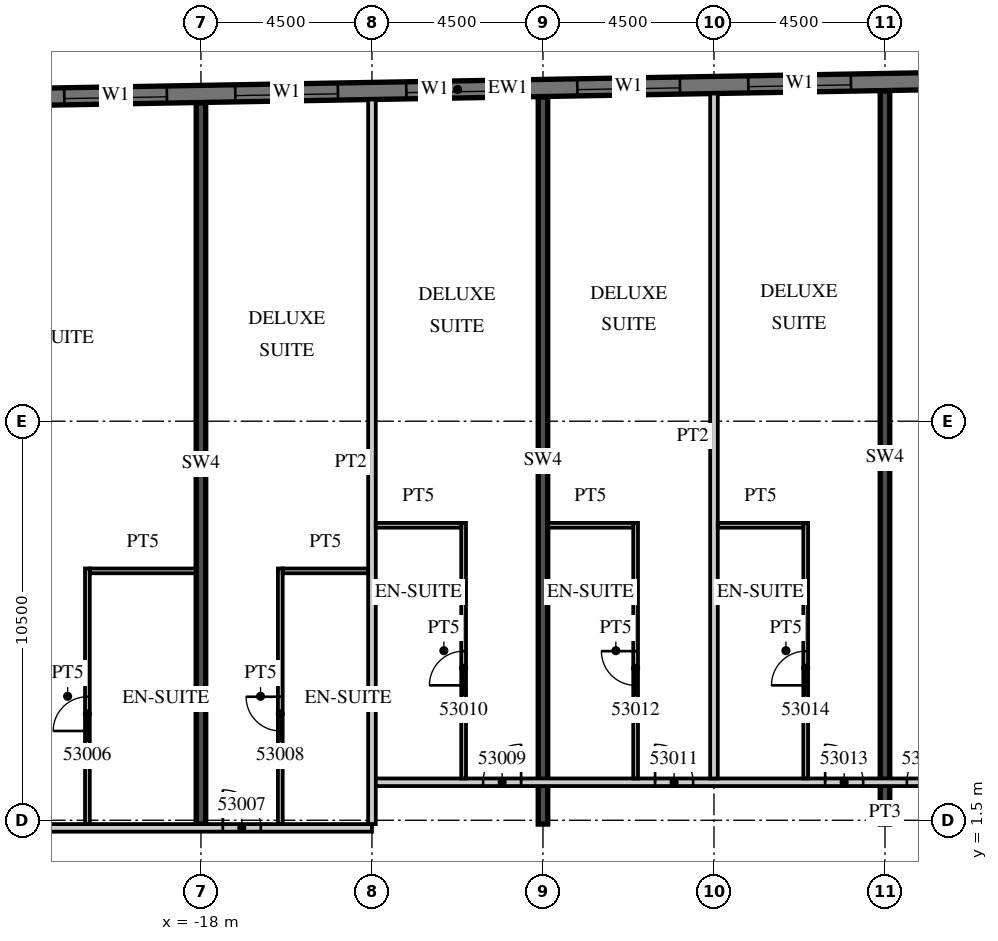
"""IFC4 building model, lengths in metres.
Left out: names, types, materials, properties, quantities, classifications, styles, units other than length and angle.
Written with IfcOpenShell. Run it as: python <this file> out.ifc"""

import sys

from ifc_helpers import new_model, si_unit, direction, frame, frame_2d, origin, place, context, subcontext, project, spatial, rectangle, extrude, element, fill, save


model = new_model("IFC4")
c1 = context("Model", 3, precision=1e-05, world=origin(), true_north=direction((0.0, 1.0)))
c2 = subcontext(c1, "Body", "Model", "MODEL_VIEW")
j1 = project(units=[si_unit("LENGTHUNIT", "METRE"), si_unit("PLANEANGLEUNIT", "RADIAN")], contexts=[c1])
p1 = place(None, origin())
s1 = spatial("IfcSite", under=j1, at=p1, CompositionType="ELEMENT")
p2 = place(p1, origin())
s2 = spatial("IfcBuilding", under=s1, at=p2, CompositionType="ELEMENT")
p3 = place(p2, frame((0.0, 0.0, 221.0)))
s3 = spatial("IfcBuildingStorey", under=s2, at=p3, CompositionType="ELEMENT", Elevation=221.0)
p4 = place(p3, frame((-18.0, 1.4, 0.0), z_axis=(0.0, 0.0, 1.0), x_axis=(0.0, 1.0, 0.0)))
e1 = element("IfcWall", 1, at=p4, inside=s3, PredefinedType="SHEAR", context=c2, shape_type="SweptSolid", body=[
    extrude(rectangle(XDim=18.974, YDim=0.25, at=frame_2d((9.487, 0.0))), origin(), (0.0, 0.0, 1.0), 3.3),
])
p5 = place(p3, frame((-9.0, 1.4, 0.0), z_axis=(0.0, 0.0, 1.0), x_axis=(0.0, 1.0, 0.0)))
e2 = element("IfcWall", 2, at=p5, inside=s3, PredefinedType="SHEAR", context=c2, shape_type="SweptSolid", body=[
    extrude(rectangle(XDim=19.132, YDim=0.25, at=frame_2d((9.566, 0.0))), origin(), (0.0, 0.0, 1.0), 3.3),
])
p6 = place(p3, frame((0.0, 1.4, 0.0), z_axis=(0.0, 0.0, 1.0), x_axis=(0.0, 1.0, 0.0)))
e3 = element("IfcWall", 3, at=p6, inside=s3, PredefinedType="SHEAR", context=c2, shape_type="SweptSolid", body=[
    extrude(rectangle(XDim=19.289, YDim=0.25, at=frame_2d((9.644, 0.0))), origin(), (0.0, 0.0, 1.0), 3.3),
])
p7 = place(p3, frame((13.504, 21.161, 0.0), z_axis=(0.0, 0.0, 1.0), x_axis=(-0.999847763257, -0.017448504532, 0.0)))
e4 = element("IfcWall", 4, at=p7, inside=s3, PredefinedType="SOLIDWALL", context=c2, shape_type="SweptSolid", body=[
    extrude(rectangle(XDim=46.859, YDim=0.45, at=frame_2d((23.43, 0.0))), origin(), (0.0, 0.0, 1.0), 3.02),
])
p8 = place(p7, frame((0.9, 0.0, 0.45)))
e5 = element("IfcOpeningElement", 5, at=p8, cuts=e4, PredefinedType="OPENING", context=c2, shape_type="SweptSolid", body=[
    extrude(rectangle(XDim=2.7, YDim=2.25, at=frame_2d((1.35, 1.125))), frame((0.0, 0.235, 0.0), z_axis=(0.0, -1.0, 0.0), x_axis=(1.0, 0.0, 0.0)), (0.0, 0.0, 1.0), 0.47),
])
p9 = place(p7, frame((5.401, 0.0, 0.45)))
e6 = element("IfcOpeningElement", 6, at=p9, cuts=e4, PredefinedType="OPENING", context=c2, shape_type="SweptSolid", body=[
    extrude(rectangle(XDim=2.7, YDim=2.25, at=frame_2d((1.35, 1.125))), frame((0.0, 0.235, 0.0), z_axis=(0.0, -1.0, 0.0), x_axis=(1.0, 0.0, 0.0)), (0.0, 0.0, 1.0), 0.47),
])
p10 = place(p7, frame((9.902, 0.0, 0.45)))
e7 = element("IfcOpeningElement", 7, at=p10, cuts=e4, PredefinedType="OPENING", context=c2, shape_type="SweptSolid", body=[
    extrude(rectangle(XDim=2.7, YDim=2.25, at=frame_2d((1.35, 1.125))), frame((0.0, 0.235, 0.0), z_axis=(0.0, -1.0, 0.0), x_axis=(1.0, 0.0, 0.0)), (0.0, 0.0, 1.0), 0.47),
])
p11 = place(p7, frame((14.402, 0.0, 0.45)))
e8 = element("IfcOpeningElement", 8, at=p11, cuts=e4, PredefinedType="OPENING", context=c2, shape_type="SweptSolid", body=[
    extrude(rectangle(XDim=2.7, YDim=2.25, at=frame_2d((1.35, 1.125))), frame((0.0, 0.235, 0.0), z_axis=(0.0, -1.0, 0.0), x_axis=(1.0, 0.0, 0.0)), (0.0, 0.0, 1.0), 0.47),
])
p12 = place(p7, frame((18.903, 0.0, 0.45)))
e9 = element("IfcOpeningElement", 9, at=p12, cuts=e4, PredefinedType="OPENING", context=c2, shape_type="SweptSolid", body=[
    extrude(rectangle(XDim=2.7, YDim=2.25, at=frame_2d((1.35, 1.125))), frame((0.0, 0.235, 0.0), z_axis=(0.0, -1.0, 0.0), x_axis=(1.0, 0.0, 0.0)), (0.0, 0.0, 1.0), 0.47),
])
p13 = place(p7, frame((23.404, 0.0, 0.45)))
e10 = element("IfcOpeningElement", 10, at=p13, cuts=e4, PredefinedType="OPENING", context=c2, shape_type="SweptSolid", body=[
    extrude(rectangle(XDim=2.7, YDim=2.25, at=frame_2d((1.35, 1.125))), frame((0.0, 0.235, 0.0), z_axis=(0.0, -1.0, 0.0), x_axis=(1.0, 0.0, 0.0)), (0.0, 0.0, 1.0), 0.47),
])
p14 = place(p7, frame((27.904, 0.0, 0.45)))
e11 = element("IfcOpeningElement", 11, at=p14, cuts=e4, PredefinedType="OPENING", context=c2, shape_type="SweptSolid", body=[
    extrude(rectangle(XDim=2.7, YDim=2.25, at=frame_2d((1.35, 1.125))), frame((0.0, 0.235, 0.0), z_axis=(0.0, -1.0, 0.0), x_axis=(1.0, 0.0, 0.0)), (0.0, 0.0, 1.0), 0.47),
])
p15 = place(p7, frame((32.405, 0.0, 0.45)))
e12 = element("IfcOpeningElement", 12, at=p15, cuts=e4, PredefinedType="OPENING", context=c2, shape_type="SweptSolid", body=[
    extrude(rectangle(XDim=2.7, YDim=2.25, at=frame_2d((1.35, 1.125))), frame((0.0, 0.235, 0.0), z_axis=(0.0, -1.0, 0.0), x_axis=(1.0, 0.0, 0.0)), (0.0, 0.0, 1.0), 0.47),
])
p16 = place(p7, frame((36.906, 0.0, 0.45)))
e13 = element("IfcOpeningElement", 13, at=p16, cuts=e4, PredefinedType="OPENING", context=c2, shape_type="SweptSolid", body=[
    extrude(rectangle(XDim=2.7, YDim=2.25, at=frame_2d((1.35, 1.125))), frame((0.0, 0.235, 0.0), z_axis=(0.0, -1.0, 0.0), x_axis=(1.0, 0.0, 0.0)), (0.0, 0.0, 1.0), 0.47),
])
p17 = place(p7, frame((41.406, 0.0, 0.45)))
e14 = element("IfcOpeningElement", 14, at=p17, cuts=e4, PredefinedType="OPENING", context=c2, shape_type="SweptSolid", body=[
    extrude(rectangle(XDim=2.7, YDim=2.25, at=frame_2d((1.35, 1.125))), frame((0.0, 0.235, 0.0), z_axis=(0.0, -1.0, 0.0), x_axis=(1.0, 0.0, 0.0)), (0.0, 0.0, 1.0), 0.47),
])
p18 = place(p3, frame((-36.566, 1.3, 0.0), z_axis=(0.0, 0.0, 1.0), x_axis=(1.0, 0.0, 0.0)))
e15 = element("IfcWall", 15, at=p18, inside=s3, PredefinedType="PARTITIONING", context=c2, shape_type="SweptSolid", body=[
    extrude(rectangle(XDim=23.066, YDim=0.2, at=frame_2d((11.533, 0.0))), origin(), (0.0, 0.0, 1.0), 3.02),
])
p19 = place(p18, frame((1.141, 0.0, 0.0)))
e16 = element("IfcOpeningElement", 16, at=p19, cuts=e15, PredefinedType="OPENING", context=c2, shape_type="SweptSolid", body=[
    extrude(rectangle(XDim=1.0, YDim=2.1, at=frame_2d((0.5, 1.05))), frame((0.0, 0.11, 0.0), z_axis=(0.0, -1.0, 0.0), x_axis=(1.0, 0.0, 0.0)), (0.0, 0.0, 1.0), 0.22),
])
p20 = place(p18, frame((7.991, 0.0, 0.0)))
e17 = element("IfcOpeningElement", 17, at=p20, cuts=e15, PredefinedType="OPENING", context=c2, shape_type="SweptSolid", body=[
    extrude(rectangle(XDim=1.0, YDim=2.1, at=frame_2d((0.5, 1.05))), frame((0.0, 0.11, 0.0), z_axis=(0.0, -1.0, 0.0), x_axis=(1.0, 0.0, 0.0)), (0.0, 0.0, 1.0), 0.22),
])
p21 = place(p18, frame((12.004, 0.0, 0.0)))
e18 = element("IfcOpeningElement", 18, at=p21, cuts=e15, PredefinedType="OPENING", context=c2, shape_type="SweptSolid", body=[
    extrude(rectangle(XDim=1.2, YDim=2.1, at=frame_2d((0.6, 1.05))), frame((0.0, 0.11, 0.0), z_axis=(0.0, -1.0, 0.0), x_axis=(1.0, 0.0, 0.0)), (0.0, 0.0, 1.0), 0.22),
])
p22 = place(p18, frame((19.141, 0.0, 0.0)))
e19 = element("IfcOpeningElement", 19, at=p22, cuts=e15, PredefinedType="OPENING", context=c2, shape_type="SweptSolid", body=[
    extrude(rectangle(XDim=1.0, YDim=2.1, at=frame_2d((0.5, 1.05))), frame((0.0, 0.11, 0.0), z_axis=(0.0, -1.0, 0.0), x_axis=(1.0, 0.0, 0.0)), (0.0, 0.0, 1.0), 0.22),
])
p23 = place(p3, frame((-13.5, 2.5, 0.0), z_axis=(0.0, 0.0, 1.0), x_axis=(1.0, 0.0, 0.0)))
e20 = element("IfcWall", 20, at=p23, inside=s3, PredefinedType="PARTITIONING", context=c2, shape_type="SweptSolid", body=[
    extrude(rectangle(XDim=27.0, YDim=0.2, at=frame_2d((13.5, 0.0))), origin(), (0.0, 0.0, 1.0), 3.02),
])
p24 = place(p23, frame((2.925, 0.0, 0.0)))
e21 = element("IfcOpeningElement", 21, at=p24, cuts=e20, PredefinedType="OPENING", context=c2, shape_type="SweptSolid", body=[
    extrude(rectangle(XDim=1.0, YDim=2.1, at=frame_2d((0.5, 1.05))), frame((0.0, 0.11, 0.0), z_axis=(0.0, -1.0, 0.0), x_axis=(1.0, 0.0, 0.0)), (0.0, 0.0, 1.0), 0.22),
])
p25 = place(p23, frame((7.45, 0.0, 0.0)))
e22 = element("IfcOpeningElement", 22, at=p25, cuts=e20, PredefinedType="OPENING", context=c2, shape_type="SweptSolid", body=[
    extrude(rectangle(XDim=1.0, YDim=2.1, at=frame_2d((0.5, 1.05))), frame((0.0, 0.11, 0.0), z_axis=(0.0, -1.0, 0.0), x_axis=(1.0, 0.0, 0.0)), (0.0, 0.0, 1.0), 0.22),
])
p26 = place(p23, frame((11.925, 0.0, 0.0)))
e23 = element("IfcOpeningElement", 23, at=p26, cuts=e20, PredefinedType="OPENING", context=c2, shape_type="SweptSolid", body=[
    extrude(rectangle(XDim=1.0, YDim=2.1, at=frame_2d((0.5, 1.05))), frame((0.0, 0.11, 0.0), z_axis=(0.0, -1.0, 0.0), x_axis=(1.0, 0.0, 0.0)), (0.0, 0.0, 1.0), 0.22),
])
p27 = place(p23, frame((14.075, 0.0, 0.0)))
e24 = element("IfcOpeningElement", 24, at=p27, cuts=e20, PredefinedType="OPENING", context=c2, shape_type="SweptSolid", body=[
    extrude(rectangle(XDim=1.0, YDim=2.1, at=frame_2d((0.5, 1.05))), frame((0.0, 0.11, 0.0), z_axis=(0.0, -1.0, 0.0), x_axis=(1.0, 0.0, 0.0)), (0.0, 0.0, 1.0), 0.22),
])
p28 = place(p23, frame((20.925, 0.0, 0.0)))
e25 = element("IfcOpeningElement", 25, at=p28, cuts=e20, PredefinedType="OPENING", context=c2, shape_type="SweptSolid", body=[
    extrude(rectangle(XDim=1.0, YDim=2.1, at=frame_2d((0.5, 1.05))), frame((0.0, 0.11, 0.0), z_axis=(0.0, -1.0, 0.0), x_axis=(1.0, 0.0, 0.0)), (0.0, 0.0, 1.0), 0.22),
])
p29 = place(p23, frame((25.425, 0.0, 0.0)))
e26 = element("IfcOpeningElement", 26, at=p29, cuts=e20, PredefinedType="OPENING", context=c2, shape_type="SweptSolid", body=[
    extrude(rectangle(XDim=1.0, YDim=2.1, at=frame_2d((0.5, 1.05))), frame((0.0, 0.11, 0.0), z_axis=(0.0, -1.0, 0.0), x_axis=(1.0, 0.0, 0.0)), (0.0, 0.0, 1.0), 0.22),
])
p30 = place(p3, frame((-20.988, 1.4, 0.0), z_axis=(0.0, 0.0, 1.0), x_axis=(0.0, 1.0, 0.0)))
e27 = element("IfcWall", 27, at=p30, inside=s3, PredefinedType="PARTITIONING", context=c2, shape_type="SweptSolid", body=[
    extrude(rectangle(XDim=6.725, YDim=0.125, at=frame_2d((3.363, 0.0))), origin(), (0.0, 0.0, 1.0), 3.02),
])
p31 = place(p30, frame((2.45, 0.0, 0.0)))
e28 = element("IfcOpeningElement", 28, at=p31, cuts=e27, PredefinedType="OPENING", context=c2, shape_type="SweptSolid", body=[
    extrude(rectangle(XDim=0.9, YDim=2.1, at=frame_2d((0.45, 1.05))), frame((0.0, 0.073, 0.0), z_axis=(0.0, -1.0, 0.0), x_axis=(1.0, 0.0, 0.0)), (0.0, 0.0, 1.0), 0.145),
])
p32 = place(p3, frame((-20.925, 8.062, 0.0), z_axis=(0.0, 0.0, 1.0), x_axis=(1.0, 0.0, 0.0)))
e29 = element("IfcWall", 29, at=p32, inside=s3, PredefinedType="PARTITIONING", context=c2, shape_type="SweptSolid", body=[
    extrude(rectangle(XDim=2.8, YDim=0.125, at=frame_2d((1.4, 0.0))), origin(), (0.0, 0.0, 1.0), 3.02),
])
p33 = place(p3, frame((-13.5, 1.4, 0.0), z_axis=(0.0, 0.0, 1.0), x_axis=(0.0, 1.0, 0.0)))
e30 = element("IfcWall", 30, at=p33, inside=s3, PredefinedType="PARTITIONING", context=c2, shape_type="SweptSolid", body=[
    extrude(rectangle(XDim=19.065, YDim=0.2, at=frame_2d((9.533, 0.0))), origin(), (0.0, 0.0, 1.0), 3.02),
])
p34 = place(p3, frame((-15.912, 1.4, 0.0), z_axis=(0.0, 0.0, 1.0), x_axis=(0.0, 1.0, 0.0)))
e31 = element("IfcWall", 31, at=p34, inside=s3, PredefinedType="PARTITIONING", context=c2, shape_type="SweptSolid", body=[
    extrude(rectangle(XDim=6.725, YDim=0.125, at=frame_2d((3.363, 0.0))), origin(), (0.0, 0.0, 1.0), 3.02),
])
p35 = place(p34, frame((2.45, 0.0, 0.0)))
e32 = element("IfcOpeningElement", 32, at=p35, cuts=e31, PredefinedType="OPENING", context=c2, shape_type="SweptSolid", body=[
    extrude(rectangle(XDim=0.9, YDim=2.1, at=frame_2d((0.45, 1.05))), frame((0.0, 0.073, 0.0), z_axis=(0.0, -1.0, 0.0), x_axis=(1.0, 0.0, 0.0)), (0.0, 0.0, 1.0), 0.145),
])
p36 = place(p3, frame((-15.85, 8.062, 0.0), z_axis=(0.0, 0.0, 1.0), x_axis=(1.0, 0.0, 0.0)))
e33 = element("IfcWall", 33, at=p36, inside=s3, PredefinedType="PARTITIONING", context=c2, shape_type="SweptSolid", body=[
    extrude(rectangle(XDim=2.25, YDim=0.125, at=frame_2d((1.125, 0.0))), origin(), (0.0, 0.0, 1.0), 3.02),
])
p37 = place(p3, frame((-11.088, 2.6, 0.0), z_axis=(0.0, 0.0, 1.0), x_axis=(0.0, 1.0, 0.0)))
e34 = element("IfcWall", 34, at=p37, inside=s3, PredefinedType="PARTITIONING", context=c2, shape_type="SweptSolid", body=[
    extrude(rectangle(XDim=6.725, YDim=0.125, at=frame_2d((3.362, 0.0))), origin(), (0.0, 0.0, 1.0), 3.02),
])
p38 = place(p37, frame((2.45, 0.0, 0.0)))
e35 = element("IfcOpeningElement", 35, at=p38, cuts=e34, PredefinedType="OPENING", context=c2, shape_type="SweptSolid", body=[
    extrude(rectangle(XDim=0.9, YDim=2.1, at=frame_2d((0.45, 1.05))), frame((0.0, 0.073, 0.0), z_axis=(0.0, -1.0, 0.0), x_axis=(1.0, 0.0, 0.0)), (0.0, 0.0, 1.0), 0.145),
])
p39 = place(p3, frame((-13.4, 9.262, 0.0), z_axis=(0.0, 0.0, 1.0), x_axis=(1.0, 0.0, 0.0)))
e36 = element("IfcWall", 36, at=p39, inside=s3, PredefinedType="PARTITIONING", context=c2, shape_type="SweptSolid", body=[
    extrude(rectangle(XDim=2.25, YDim=0.125, at=frame_2d((1.125, 0.0))), origin(), (0.0, 0.0, 1.0), 3.02),
])
p40 = place(p3, frame((-4.5, 2.6, 0.0), z_axis=(0.0, 0.0, 1.0), x_axis=(0.0, 1.0, 0.0)))
e37 = element("IfcWall", 37, at=p40, inside=s3, PredefinedType="PARTITIONING", context=c2, shape_type="SweptSolid", body=[
    extrude(rectangle(XDim=18.022, YDim=0.2, at=frame_2d((9.011, 0.0))), origin(), (0.0, 0.0, 1.0), 3.02),
])
p41 = place(p3, frame((-6.562, 2.6, 0.0), z_axis=(0.0, 0.0, 1.0), x_axis=(0.0, 1.0, 0.0)))
e38 = element("IfcWall", 38, at=p41, inside=s3, PredefinedType="PARTITIONING", context=c2, shape_type="SweptSolid", body=[
    extrude(rectangle(XDim=6.725, YDim=0.125, at=frame_2d((3.362, 0.0))), origin(), (0.0, 0.0, 1.0), 3.02),
])
p42 = place(p41, frame((2.45, 0.0, 0.0)))
e39 = element("IfcOpeningElement", 39, at=p42, cuts=e38, PredefinedType="OPENING", context=c2, shape_type="SweptSolid", body=[
    extrude(rectangle(XDim=0.9, YDim=2.1, at=frame_2d((0.45, 1.05))), frame((0.0, 0.073, 0.0), z_axis=(0.0, -1.0, 0.0), x_axis=(1.0, 0.0, 0.0)), (0.0, 0.0, 1.0), 0.145),
])
p43 = place(p3, frame((-8.875, 9.262, 0.0), z_axis=(0.0, 0.0, 1.0), x_axis=(1.0, 0.0, 0.0)))
e40 = element("IfcWall", 40, at=p43, inside=s3, PredefinedType="PARTITIONING", context=c2, shape_type="SweptSolid", body=[
    extrude(rectangle(XDim=2.25, YDim=0.125, at=frame_2d((1.125, 0.0))), origin(), (0.0, 0.0, 1.0), 3.02),
])
p44 = place(p3, frame((-2.087, 2.6, 0.0), z_axis=(0.0, 0.0, 1.0), x_axis=(0.0, 1.0, 0.0)))
e41 = element("IfcWall", 41, at=p44, inside=s3, PredefinedType="PARTITIONING", context=c2, shape_type="SweptSolid", body=[
    extrude(rectangle(XDim=6.725, YDim=0.125, at=frame_2d((3.362, 0.0))), origin(), (0.0, 0.0, 1.0), 3.02),
])
p45 = place(p44, frame((2.45, 0.0, 0.0)))
e42 = element("IfcOpeningElement", 42, at=p45, cuts=e41, PredefinedType="OPENING", context=c2, shape_type="SweptSolid", body=[
    extrude(rectangle(XDim=0.9, YDim=2.1, at=frame_2d((0.45, 1.05))), frame((0.0, 0.073, 0.0), z_axis=(0.0, -1.0, 0.0), x_axis=(1.0, 0.0, 0.0)), (0.0, 0.0, 1.0), 0.145),
])
p46 = place(p3, frame((-4.4, 9.262, 0.0), z_axis=(0.0, 0.0, 1.0), x_axis=(1.0, 0.0, 0.0)))
e43 = element("IfcWall", 43, at=p46, inside=s3, PredefinedType="PARTITIONING", context=c2, shape_type="SweptSolid", body=[
    extrude(rectangle(XDim=2.25, YDim=0.125, at=frame_2d((1.125, 0.0))), origin(), (0.0, 0.0, 1.0), 3.02),
])
p47 = place(p11, origin())
e44 = element("IfcWindow", 44, at=p47, inside=s3, PartitioningType="SINGLE_PANEL", PredefinedType="WINDOW", context=c2, shape_type="SweptSolid", body=[
    extrude(rectangle(XDim=2.7, YDim=2.25, at=frame_2d((1.35, 1.125))), frame((0.0, 0.09, 0.0), z_axis=(0.0, -1.0, 0.0), x_axis=(1.0, 0.0, 0.0)), (0.0, 0.0, 1.0), 0.06),
])
fill(e8, e44)
p48 = place(p12, origin())
e45 = element("IfcWindow", 45, at=p48, inside=s3, PartitioningType="SINGLE_PANEL", PredefinedType="WINDOW", context=c2, shape_type="SweptSolid", body=[
    extrude(rectangle(XDim=2.7, YDim=2.25, at=frame_2d((1.35, 1.125))), frame((0.0, 0.09, 0.0), z_axis=(0.0, -1.0, 0.0), x_axis=(1.0, 0.0, 0.0)), (0.0, 0.0, 1.0), 0.06),
])
fill(e9, e45)
p49 = place(p13, origin())
e46 = element("IfcWindow", 46, at=p49, inside=s3, PartitioningType="SINGLE_PANEL", PredefinedType="WINDOW", context=c2, shape_type="SweptSolid", body=[
    extrude(rectangle(XDim=2.7, YDim=2.25, at=frame_2d((1.35, 1.125))), frame((0.0, 0.09, 0.0), z_axis=(0.0, -1.0, 0.0), x_axis=(1.0, 0.0, 0.0)), (0.0, 0.0, 1.0), 0.06),
])
fill(e10, e46)
p50 = place(p14, origin())
e47 = element("IfcWindow", 47, at=p50, inside=s3, PartitioningType="SINGLE_PANEL", PredefinedType="WINDOW", context=c2, shape_type="SweptSolid", body=[
    extrude(rectangle(XDim=2.7, YDim=2.25, at=frame_2d((1.35, 1.125))), frame((0.0, 0.09, 0.0), z_axis=(0.0, -1.0, 0.0), x_axis=(1.0, 0.0, 0.0)), (0.0, 0.0, 1.0), 0.06),
])
fill(e11, e47)
p51 = place(p15, origin())
e48 = element("IfcWindow", 48, at=p51, inside=s3, PartitioningType="SINGLE_PANEL", PredefinedType="WINDOW", context=c2, shape_type="SweptSolid", body=[
    extrude(rectangle(XDim=2.7, YDim=2.25, at=frame_2d((1.35, 1.125))), frame((0.0, 0.09, 0.0), z_axis=(0.0, -1.0, 0.0), x_axis=(1.0, 0.0, 0.0)), (0.0, 0.0, 1.0), 0.06),
])
fill(e12, e48)
p52 = place(p31, origin())
e49 = element("IfcDoor", 49, at=p52, inside=s3, OperationType="SINGLE_SWING_LEFT", PredefinedType="DOOR", context=c2, shape_type="SweptSolid", body=[
    extrude(rectangle(XDim=0.9, YDim=2.1, at=frame_2d((0.45, 1.05))), frame((0.0, 0.025, 0.0), z_axis=(0.0, -1.0, 0.0), x_axis=(1.0, 0.0, 0.0)), (0.0, 0.0, 1.0), 0.05),
])
fill(e28, e49)
p53 = place(p22, origin())
e50 = element("IfcDoor", 50, at=p53, inside=s3, OperationType="SINGLE_SWING_LEFT", PredefinedType="DOOR", context=c2, shape_type="SweptSolid", body=[
    extrude(rectangle(XDim=1.0, YDim=2.1, at=frame_2d((0.5, 1.05))), frame((0.0, 0.025, 0.0), z_axis=(0.0, -1.0, 0.0), x_axis=(1.0, 0.0, 0.0)), (0.0, 0.0, 1.0), 0.05),
])
fill(e19, e50)
p54 = place(p35, origin())
e51 = element("IfcDoor", 51, at=p54, inside=s3, OperationType="SINGLE_SWING_RIGHT", PredefinedType="DOOR", context=c2, shape_type="SweptSolid", body=[
    extrude(rectangle(XDim=0.9, YDim=2.1, at=frame_2d((0.45, 1.05))), frame((0.0, 0.025, 0.0), z_axis=(0.0, -1.0, 0.0), x_axis=(1.0, 0.0, 0.0)), (0.0, 0.0, 1.0), 0.05),
])
fill(e32, e51)
p55 = place(p24, origin())
e52 = element("IfcDoor", 52, at=p55, inside=s3, OperationType="SINGLE_SWING_RIGHT", PredefinedType="DOOR", context=c2, shape_type="SweptSolid", body=[
    extrude(rectangle(XDim=1.0, YDim=2.1, at=frame_2d((0.5, 1.05))), frame((0.0, 0.025, 0.0), z_axis=(0.0, -1.0, 0.0), x_axis=(1.0, 0.0, 0.0)), (0.0, 0.0, 1.0), 0.05),
])
fill(e21, e52)
p56 = place(p38, origin())
e53 = element("IfcDoor", 53, at=p56, inside=s3, OperationType="SINGLE_SWING_LEFT", PredefinedType="DOOR", context=c2, shape_type="SweptSolid", body=[
    extrude(rectangle(XDim=0.9, YDim=2.1, at=frame_2d((0.45, 1.05))), frame((0.0, 0.025, 0.0), z_axis=(0.0, -1.0, 0.0), x_axis=(1.0, 0.0, 0.0)), (0.0, 0.0, 1.0), 0.05),
])
fill(e35, e53)
p57 = place(p25, origin())
e54 = element("IfcDoor", 54, at=p57, inside=s3, OperationType="SINGLE_SWING_LEFT", PredefinedType="DOOR", context=c2, shape_type="SweptSolid", body=[
    extrude(rectangle(XDim=1.0, YDim=2.1, at=frame_2d((0.5, 1.05))), frame((0.0, 0.025, 0.0), z_axis=(0.0, -1.0, 0.0), x_axis=(1.0, 0.0, 0.0)), (0.0, 0.0, 1.0), 0.05),
])
fill(e22, e54)
p58 = place(p42, origin())
e55 = element("IfcDoor", 55, at=p58, inside=s3, OperationType="SINGLE_SWING_RIGHT", PredefinedType="DOOR", context=c2, shape_type="SweptSolid", body=[
    extrude(rectangle(XDim=0.9, YDim=2.1, at=frame_2d((0.45, 1.05))), frame((0.0, 0.025, 0.0), z_axis=(0.0, -1.0, 0.0), x_axis=(1.0, 0.0, 0.0)), (0.0, 0.0, 1.0), 0.05),
])
fill(e39, e55)
p59 = place(p26, origin())
e56 = element("IfcDoor", 56, at=p59, inside=s3, OperationType="SINGLE_SWING_LEFT", PredefinedType="DOOR", context=c2, shape_type="SweptSolid", body=[
    extrude(rectangle(XDim=1.0, YDim=2.1, at=frame_2d((0.5, 1.05))), frame((0.0, 0.025, 0.0), z_axis=(0.0, -1.0, 0.0), x_axis=(1.0, 0.0, 0.0)), (0.0, 0.0, 1.0), 0.05),
])
fill(e23, e56)
p60 = place(p45, origin())
e57 = element("IfcDoor", 57, at=p60, inside=s3, OperationType="SINGLE_SWING_LEFT", PredefinedType="DOOR", context=c2, shape_type="SweptSolid", body=[
    extrude(rectangle(XDim=0.9, YDim=2.1, at=frame_2d((0.45, 1.05))), frame((0.0, 0.025, 0.0), z_axis=(0.0, -1.0, 0.0), x_axis=(1.0, 0.0, 0.0)), (0.0, 0.0, 1.0), 0.05),
])
fill(e42, e57)
p61 = place(p27, origin())
e58 = element("IfcDoor", 58, at=p61, inside=s3, OperationType="SINGLE_SWING_RIGHT", PredefinedType="DOOR", context=c2, shape_type="SweptSolid", body=[
    extrude(rectangle(XDim=1.0, YDim=2.1, at=frame_2d((0.5, 1.05))), frame((0.0, 0.025, 0.0), z_axis=(0.0, -1.0, 0.0), x_axis=(1.0, 0.0, 0.0)), (0.0, 0.0, 1.0), 0.05),
])
fill(e24, e58)
save(model, sys.argv[1])
